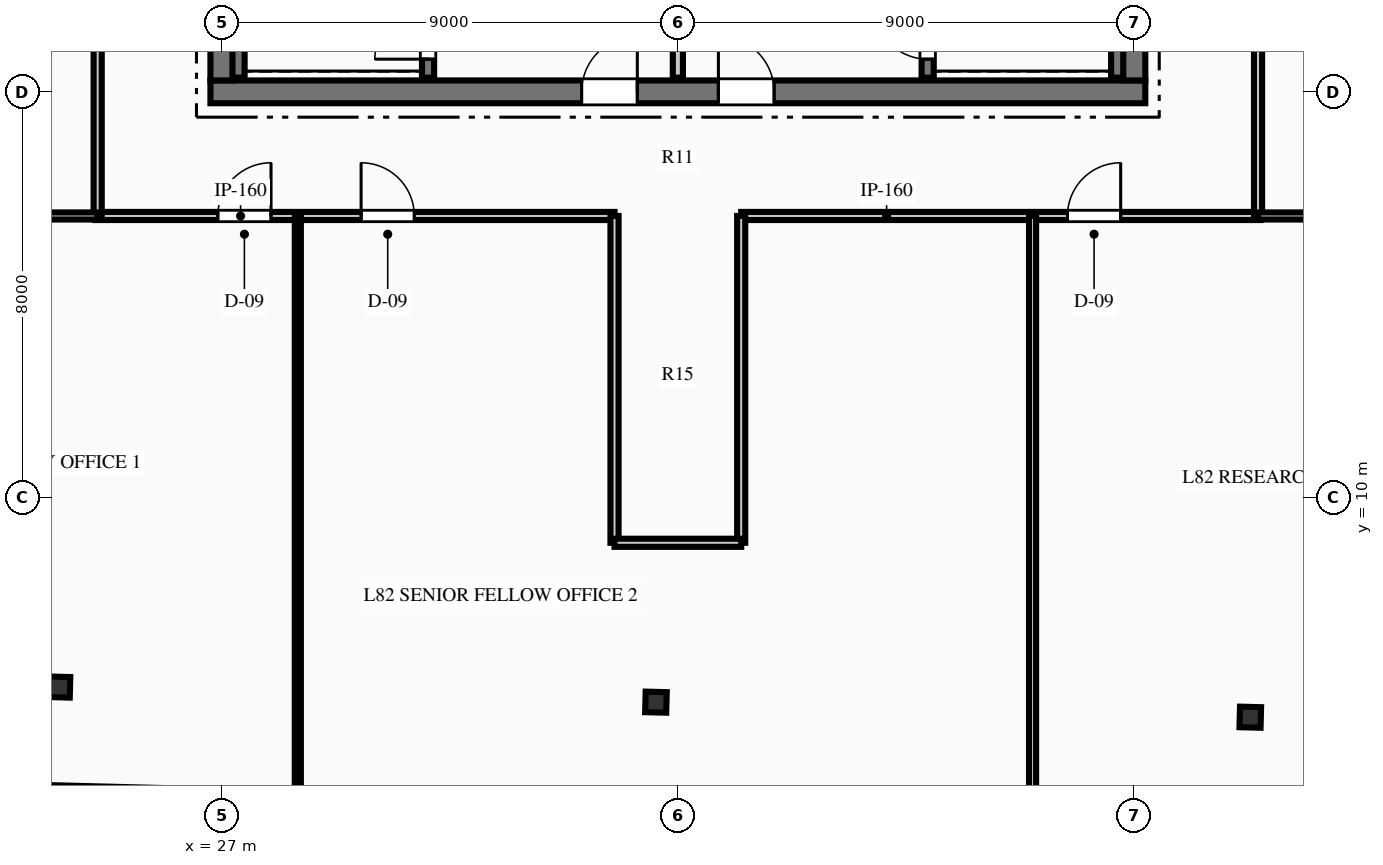
"""IFC4 building model, lengths in metres.
Left out: names, types, materials, properties, quantities, classifications, styles, units other than length and angle.
Written with IfcOpenShell. Run it as: python <this file> out.ifc"""

import sys

from ifc_helpers import new_model, si_unit, direction, frame, frame_2d, origin, origin_2d, place, context, subcontext, project, spatial, rectangle, i_section, extrude, element, fill, save


model = new_model("IFC4")
c1 = context("Model", 3, precision=1e-05, world=origin(), true_north=direction((0.0, 1.0)))
c2 = subcontext(c1, "Body", "Model", "MODEL_VIEW")
j1 = project(units=[si_unit("LENGTHUNIT", "METRE"), si_unit("PLANEANGLEUNIT", "RADIAN")], contexts=[c1])
p1 = place(None, origin())
s1 = spatial("IfcSite", under=j1, at=p1, CompositionType="ELEMENT")
p2 = place(p1, origin())
s2 = spatial("IfcBuilding", under=s1, at=p2, CompositionType="ELEMENT")
p3 = place(p2, frame((0.0, 0.0, 325.2)))
s3 = spatial("IfcBuildingStorey", under=s2, at=p3, CompositionType="ELEMENT", Elevation=325.2)
p4 = place(p3, frame((26.775, 18.0, 0.0), z_axis=(0.0, 0.0, 1.0), x_axis=(1.0, 0.0, 0.0)))
e1 = element("IfcWall", 1, at=p4, inside=s3, PredefinedType="SHEAR", context=c2, shape_type="SweptSolid", body=[
    extrude(rectangle(XDim=18.45, YDim=0.45, at=frame_2d((9.225, 0.0))), origin(), (0.0, 0.0, 1.0), 3.75),
])
p5 = place(p4, frame((7.325, 0.0, 0.0)))
e2 = element("IfcOpeningElement", 2, at=p5, cuts=e1, PredefinedType="OPENING", context=c2, shape_type="SweptSolid", body=[
    extrude(rectangle(XDim=1.1, YDim=2.15, at=frame_2d((0.55, 1.075))), frame((0.0, 0.235, 0.0), z_axis=(0.0, -1.0, 0.0), x_axis=(1.0, 0.0, 0.0)), (0.0, 0.0, 1.0), 0.47),
])
p6 = place(p4, frame((10.025, 0.0, 0.0)))
e3 = element("IfcOpeningElement", 3, at=p6, cuts=e1, PredefinedType="OPENING", context=c2, shape_type="SweptSolid", body=[
    extrude(rectangle(XDim=1.1, YDim=2.15, at=frame_2d((0.55, 1.075))), frame((0.0, 0.235, 0.0), z_axis=(0.0, -1.0, 0.0), x_axis=(1.0, 0.0, 0.0)), (0.0, 0.0, 1.0), 0.47),
])
p7 = place(p3, frame((27.0, 18.225, 0.0), z_axis=(0.0, 0.0, 1.0), x_axis=(0.0, 1.0, 0.0)))
e4 = element("IfcWall", 4, at=p7, inside=s3, PredefinedType="SHEAR", context=c2, shape_type="SweptSolid", body=[
    extrude(rectangle(XDim=15.55, YDim=0.45, at=frame_2d((7.775, 0.0))), origin(), (0.0, 0.0, 1.0), 3.75),
])
p8 = place(p7, frame((10.015, 0.0, 0.0)))
e5 = element("IfcOpeningElement", 5, at=p8, cuts=e4, PredefinedType="OPENING", context=c2, shape_type="SweptSolid", body=[
    extrude(rectangle(XDim=1.4, YDim=2.2, at=frame_2d((0.7, 1.1))), frame((0.0, 0.235, 0.0), z_axis=(0.0, -1.0, 0.0), x_axis=(1.0, 0.0, 0.0)), (0.0, 0.0, 1.0), 0.47),
])
p9 = place(p3, frame((45.0, 18.225, 0.0), z_axis=(0.0, 0.0, 1.0), x_axis=(0.0, 1.0, 0.0)))
e6 = element("IfcWall", 6, at=p9, inside=s3, PredefinedType="SHEAR", context=c2, shape_type="SweptSolid", body=[
    extrude(rectangle(XDim=15.55, YDim=0.45, at=frame_2d((7.775, 0.0))), origin(), (0.0, 0.0, 1.0), 3.75),
])
p10 = place(p9, frame((10.015, 0.0, 0.0)))
e7 = element("IfcOpeningElement", 7, at=p10, cuts=e6, PredefinedType="OPENING", context=c2, shape_type="SweptSolid", body=[
    extrude(rectangle(XDim=1.4, YDim=2.2, at=frame_2d((0.7, 1.1))), frame((0.0, 0.235, 0.0), z_axis=(0.0, -1.0, 0.0), x_axis=(1.0, 0.0, 0.0)), (0.0, 0.0, 1.0), 0.47),
])
p11 = place(p3, frame((31.07, 18.28, 0.0), z_axis=(0.0, 0.0, 1.0), x_axis=(0.0, 1.0, 0.0)))
e8 = element("IfcWall", 8, at=p11, inside=s3, PredefinedType="SHEAR", context=c2, shape_type="SweptSolid", body=[
    extrude(rectangle(XDim=8.26, YDim=0.24, at=frame_2d((4.13, 0.0))), origin(), (0.0, 0.0, 1.0), 3.75),
])
p12 = place(p11, frame((0.365, 0.0, 0.0)))
e9 = element("IfcOpeningElement", 9, at=p12, cuts=e8, PredefinedType="OPENING", context=c2, shape_type="SweptSolid", body=[
    extrude(rectangle(XDim=1.05, YDim=2.15, at=frame_2d((0.525, 1.075))), frame((0.0, 0.13, 0.0), z_axis=(0.0, -1.0, 0.0), x_axis=(1.0, 0.0, 0.0)), (0.0, 0.0, 1.0), 0.26),
])
p13 = place(p3, frame((27.33, 18.28, 0.0), z_axis=(0.0, 0.0, 1.0), x_axis=(0.0, 1.0, 0.0)))
e10 = element("IfcWall", 10, at=p13, inside=s3, PredefinedType="SHEAR", context=c2, shape_type="SweptSolid", body=[
    extrude(rectangle(XDim=8.26, YDim=0.24, at=frame_2d((4.13, 0.0))), origin(), (0.0, 0.0, 1.0), 3.75),
])
p14 = place(p3, frame((40.93, 18.28, 0.0), z_axis=(0.0, 0.0, 1.0), x_axis=(0.0, 1.0, 0.0)))
e11 = element("IfcWall", 11, at=p14, inside=s3, PredefinedType="SHEAR", context=c2, shape_type="SweptSolid", body=[
    extrude(rectangle(XDim=8.26, YDim=0.24, at=frame_2d((4.13, 0.0))), origin(), (0.0, 0.0, 1.0), 3.75),
])
p15 = place(p14, frame((0.365, 0.0, 0.0)))
e12 = element("IfcOpeningElement", 12, at=p15, cuts=e11, PredefinedType="OPENING", context=c2, shape_type="SweptSolid", body=[
    extrude(rectangle(XDim=1.05, YDim=2.15, at=frame_2d((0.525, 1.075))), frame((0.0, 0.13, 0.0), z_axis=(0.0, -1.0, 0.0), x_axis=(1.0, 0.0, 0.0)), (0.0, 0.0, 1.0), 0.26),
])
p16 = place(p3, frame((44.67, 18.28, 0.0), z_axis=(0.0, 0.0, 1.0), x_axis=(0.0, 1.0, 0.0)))
e13 = element("IfcWall", 13, at=p16, inside=s3, PredefinedType="SHEAR", context=c2, shape_type="SweptSolid", body=[
    extrude(rectangle(XDim=8.26, YDim=0.24, at=frame_2d((4.13, 0.0))), origin(), (0.0, 0.0, 1.0), 3.75),
])
for number, where, z_axis, x_axis in (
    (14, (23.796, 6.252, 0.0), (0.0, 0.0, 1.0), (0.025, 1.0, 0.0)),
    (15, (35.568, 5.955, 0.0), (0.0, 0.0, 1.0), (0.025, 1.0, 0.0)),
    (16, (47.297, 5.658, 0.0), (0.0, 0.0, 1.0), (0.025, 1.0, 0.0)),
):
    element("IfcColumn", number, at=place(p3, frame(where, z_axis=z_axis, x_axis=x_axis)), inside=s3, PredefinedType="COLUMN", context=c2, shape_type="SweptSolid", body=[
        extrude(i_section(OverallWidth=0.406, OverallDepth=0.416, WebThickness=0.03, FlangeThickness=0.048, at=origin_2d()), origin(), (0.0, 0.0, 1.0), 3.75),
    ])
p17 = place(p3, frame((36.0, 18.28, 0.0), z_axis=(0.0, 0.0, 1.0), x_axis=(0.0, 1.0, 0.0)))
e17 = element("IfcWall", 17, at=p17, inside=s3, PredefinedType="PARTITIONING", context=c2, shape_type="SweptSolid", body=[
    extrude(rectangle(XDim=3.77, YDim=0.2, at=frame_2d((1.885, 0.0))), origin(), (0.0, 0.0, 1.0), 3.49),
])
p18 = place(p3, frame((24.5, 15.55, 0.0), z_axis=(0.0, 0.0, 1.0), x_axis=(1.0, 0.0, 0.0)))
e18 = element("IfcWall", 18, at=p18, inside=s3, PredefinedType="PARTITIONING", context=c2, shape_type="SweptSolid", body=[
    extrude(rectangle(XDim=10.25, YDim=0.16, at=frame_2d((5.125, 0.0))), origin(), (0.0, 0.0, 1.0), 3.49),
])
p19 = place(p18, frame((2.421, 0.0, 0.0)))
e19 = element("IfcOpeningElement", 19, at=p19, cuts=e18, PredefinedType="OPENING", context=c2, shape_type="SweptSolid", body=[
    extrude(rectangle(XDim=1.05, YDim=2.15, at=frame_2d((0.525, 1.075))), frame((0.0, 0.09, 0.0), z_axis=(0.0, -1.0, 0.0), x_axis=(1.0, 0.0, 0.0)), (0.0, 0.0, 1.0), 0.18),
])
p20 = place(p18, frame((5.249, 0.0, 0.0)))
e20 = element("IfcOpeningElement", 20, at=p20, cuts=e18, PredefinedType="OPENING", context=c2, shape_type="SweptSolid", body=[
    extrude(rectangle(XDim=1.05, YDim=2.15, at=frame_2d((0.525, 1.075))), frame((0.0, 0.09, 0.0), z_axis=(0.0, -1.0, 0.0), x_axis=(1.0, 0.0, 0.0)), (0.0, 0.0, 1.0), 0.18),
])
p21 = place(p3, frame((37.25, 15.55, 0.0), z_axis=(0.0, 0.0, 1.0), x_axis=(1.0, 0.0, 0.0)))
e21 = element("IfcWall", 21, at=p21, inside=s3, PredefinedType="PARTITIONING", context=c2, shape_type="SweptSolid", body=[
    extrude(rectangle(XDim=10.25, YDim=0.16, at=frame_2d((5.125, 0.0))), origin(), (0.0, 0.0, 1.0), 3.49),
])
p22 = place(p21, frame((6.439, 0.0, 0.0)))
e22 = element("IfcOpeningElement", 22, at=p22, cuts=e21, PredefinedType="OPENING", context=c2, shape_type="SweptSolid", body=[
    extrude(rectangle(XDim=1.05, YDim=2.15, at=frame_2d((0.525, 1.075))), frame((0.0, 0.09, 0.0), z_axis=(0.0, -1.0, 0.0), x_axis=(1.0, 0.0, 0.0)), (0.0, 0.0, 1.0), 0.18),
])
p23 = place(p3, frame((24.55, 15.55, 0.0), z_axis=(0.0, 0.0, 1.0), x_axis=(0.0, 1.0, 0.0)))
e23 = element("IfcWall", 23, at=p23, inside=s3, PredefinedType="PARTITIONING", context=c2, shape_type="SweptSolid", body=[
    extrude(rectangle(XDim=9.2, YDim=0.16, at=frame_2d((4.6, 0.0))), origin(), (0.0, 0.0, 1.0), 3.49),
])
p24 = place(p23, frame((3.407, 0.0, 0.0)))
e24 = element("IfcOpeningElement", 24, at=p24, cuts=e23, PredefinedType="OPENING", context=c2, shape_type="SweptSolid", body=[
    extrude(rectangle(XDim=1.05, YDim=2.15, at=frame_2d((0.525, 1.075))), frame((0.0, 0.09, 0.0), z_axis=(0.0, -1.0, 0.0), x_axis=(1.0, 0.0, 0.0)), (0.0, 0.0, 1.0), 0.18),
])
p25 = place(p3, frame((47.45, 15.55, 0.0), z_axis=(0.0, 0.0, 1.0), x_axis=(0.0, 1.0, 0.0)))
e25 = element("IfcWall", 25, at=p25, inside=s3, PredefinedType="PARTITIONING", context=c2, shape_type="SweptSolid", body=[
    extrude(rectangle(XDim=9.2, YDim=0.16, at=frame_2d((4.6, 0.0))), origin(), (0.0, 0.0, 1.0), 3.49),
])
p26 = place(p25, frame((3.407, 0.0, 0.0)))
e26 = element("IfcOpeningElement", 26, at=p26, cuts=e25, PredefinedType="OPENING", context=c2, shape_type="SweptSolid", body=[
    extrude(rectangle(XDim=1.05, YDim=2.15, at=frame_2d((0.525, 1.075))), frame((0.0, 0.09, 0.0), z_axis=(0.0, -1.0, 0.0), x_axis=(1.0, 0.0, 0.0)), (0.0, 0.0, 1.0), 0.18),
])
for number, where, z_axis, x_axis in (
    (27, (34.75, 9.1, 0.0), (0.0, 0.0, 1.0), (0.0, 1.0, 0.0)),
    (28, (37.25, 9.1, 0.0), (0.0, 0.0, 1.0), (0.0, 1.0, 0.0)),
):
    element("IfcWall", number, at=place(p3, frame(where, z_axis=z_axis, x_axis=x_axis)), inside=s3, PredefinedType="PARTITIONING", context=c2, shape_type="SweptSolid", body=[
        extrude(rectangle(XDim=6.45, YDim=0.16, at=frame_2d((3.225, 0.0))), origin(), (0.0, 0.0, 1.0), 3.49),
    ])
p27 = place(p3, frame((34.75, 9.1, 0.0), z_axis=(0.0, 0.0, 1.0), x_axis=(1.0, 0.0, 0.0)))
e29 = element("IfcWall", 29, at=p27, inside=s3, PredefinedType="PARTITIONING", context=c2, shape_type="SweptSolid", body=[
    extrude(rectangle(XDim=2.5, YDim=0.16, at=frame_2d((1.25, 0.0))), origin(), (0.0, 0.0, 1.0), 3.49),
])
p28 = place(p3, frame((13.818, 15.55, 0.0), z_axis=(0.0, 0.0, 1.0), x_axis=(1.0, 0.0, 0.0)))
e30 = element("IfcWall", 30, at=p28, inside=s3, PredefinedType="PARTITIONING", context=c2, shape_type="SweptSolid", body=[
    extrude(rectangle(XDim=10.732, YDim=0.14, at=frame_2d((5.366, 0.0))), origin(), (0.0, 0.0, 1.0), 2.868),
])
p29 = place(p3, frame((47.45, 15.55, 0.0), z_axis=(0.0, 0.0, 1.0), x_axis=(1.0, 0.0, 0.0)))
e31 = element("IfcWall", 31, at=p29, inside=s3, PredefinedType="PARTITIONING", context=c2, shape_type="SweptSolid", body=[
    extrude(rectangle(XDim=10.377, YDim=0.14, at=frame_2d((5.189, 0.0))), origin(), (0.0, 0.0, 1.0), 2.868),
])
p30 = place(p3, frame((28.5, 3.973, 0.0), z_axis=(0.0, 0.0, 1.0), x_axis=(0.0, 1.0, 0.0)))
e32 = element("IfcWall", 32, at=p30, inside=s3, PredefinedType="PARTITIONING", context=c2, shape_type="SweptSolid", body=[
    extrude(rectangle(XDim=11.577, YDim=0.12, at=frame_2d((5.789, 0.0))), origin(), (0.0, 0.0, 1.0), 3.49),
])
p31 = place(p3, frame((43.0, 3.606, 0.0), z_axis=(0.0, 0.0, 1.0), x_axis=(0.0, 1.0, 0.0)))
e33 = element("IfcWall", 33, at=p31, inside=s3, PredefinedType="PARTITIONING", context=c2, shape_type="SweptSolid", body=[
    extrude(rectangle(XDim=11.944, YDim=0.14, at=frame_2d((5.972, 0.0))), origin(), (0.0, 0.0, 1.0), 3.49),
])
p32 = place(p12, origin())
e34 = element("IfcDoor", 34, at=p32, inside=s3, OperationType="SINGLE_SWING_LEFT", PredefinedType="DOOR", context=c2, shape_type="SweptSolid", body=[
    extrude(rectangle(XDim=1.05, YDim=2.15, at=frame_2d((0.525, 1.075))), frame((0.0, 0.025, 0.0), z_axis=(0.0, -1.0, 0.0), x_axis=(1.0, 0.0, 0.0)), (0.0, 0.0, 1.0), 0.05),
])
fill(e9, e34)
p33 = place(p15, origin())
e35 = element("IfcDoor", 35, at=p33, inside=s3, OperationType="SINGLE_SWING_RIGHT", PredefinedType="DOOR", context=c2, shape_type="SweptSolid", body=[
    extrude(rectangle(XDim=1.05, YDim=2.15, at=frame_2d((0.525, 1.075))), frame((0.0, 0.025, 0.0), z_axis=(0.0, -1.0, 0.0), x_axis=(1.0, 0.0, 0.0)), (0.0, 0.0, 1.0), 0.05),
])
fill(e12, e35)
p34 = place(p5, origin())
e36 = element("IfcDoor", 36, at=p34, inside=s3, OperationType="SINGLE_SWING_RIGHT", PredefinedType="DOOR", context=c2, shape_type="SweptSolid", body=[
    extrude(rectangle(XDim=1.1, YDim=2.15, at=frame_2d((0.55, 1.075))), frame((0.0, 0.025, 0.0), z_axis=(0.0, -1.0, 0.0), x_axis=(1.0, 0.0, 0.0)), (0.0, 0.0, 1.0), 0.05),
])
fill(e2, e36)
p35 = place(p6, origin())
e37 = element("IfcDoor", 37, at=p35, inside=s3, OperationType="SINGLE_SWING_LEFT", PredefinedType="DOOR", context=c2, shape_type="SweptSolid", body=[
    extrude(rectangle(XDim=1.1, YDim=2.15, at=frame_2d((0.55, 1.075))), frame((0.0, 0.025, 0.0), z_axis=(0.0, -1.0, 0.0), x_axis=(1.0, 0.0, 0.0)), (0.0, 0.0, 1.0), 0.05),
])
fill(e3, e37)
p36 = place(p19, origin())
e38 = element("IfcDoor", 38, at=p36, inside=s3, OperationType="SINGLE_SWING_RIGHT", PredefinedType="DOOR", context=c2, shape_type="SweptSolid", body=[
    extrude(rectangle(XDim=1.05, YDim=2.15, at=frame_2d((0.525, 1.075))), frame((0.0, 0.025, 0.0), z_axis=(0.0, -1.0, 0.0), x_axis=(1.0, 0.0, 0.0)), (0.0, 0.0, 1.0), 0.05),
])
fill(e19, e38)
p37 = place(p20, origin())
e39 = element("IfcDoor", 39, at=p37, inside=s3, OperationType="SINGLE_SWING_LEFT", PredefinedType="DOOR", context=c2, shape_type="SweptSolid", body=[
    extrude(rectangle(XDim=1.05, YDim=2.15, at=frame_2d((0.525, 1.075))), frame((0.0, 0.025, 0.0), z_axis=(0.0, -1.0, 0.0), x_axis=(1.0, 0.0, 0.0)), (0.0, 0.0, 1.0), 0.05),
])
fill(e20, e39)
p38 = place(p22, origin())
e40 = element("IfcDoor", 40, at=p38, inside=s3, OperationType="SINGLE_SWING_RIGHT", PredefinedType="DOOR", context=c2, shape_type="SweptSolid", body=[
    extrude(rectangle(XDim=1.05, YDim=2.15, at=frame_2d((0.525, 1.075))), frame((0.0, 0.025, 0.0), z_axis=(0.0, -1.0, 0.0), x_axis=(1.0, 0.0, 0.0)), (0.0, 0.0, 1.0), 0.05),
])
fill(e22, e40)
save(model, sys.argv[1])
